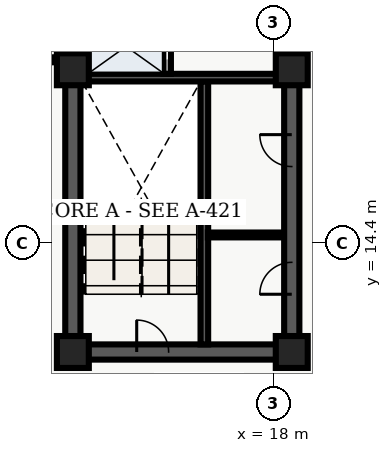
"""IFC4 building model, lengths in metres.
Left out: names, types, materials, properties, quantities, classifications, styles, units other than length and angle.
Written with IfcOpenShell. Run it as: python <this file> out.ifc"""

import sys

from ifc_helpers import new_model, entity, si_unit, converted_unit, direction, frame, origin_with_axes, origin_2d_with_axis, place, context, subcontext, project, spatial, polyline, rectangle, outline, extrude, element, fill, save


model = new_model("IFC4")
c1 = context("Model", 3, precision=1e-05, world=origin_with_axes(), true_north=direction((0.0, 1.0)))
c2 = subcontext(c1, "Body", "Model", "MODEL_VIEW")
j1 = project(units=[si_unit("LENGTHUNIT", "METRE"), converted_unit("PLANEANGLEUNIT", "DEGREE", entity("IfcPlaneAngleMeasure", 0.017), si_unit("PLANEANGLEUNIT", "RADIAN"), dimensions=[0, 0, 0, 0, 0, 0, 0])], contexts=[c1])
p1 = place(None, origin_with_axes())
s1 = spatial("IfcSite", under=j1, at=p1, CompositionType="ELEMENT")
p2 = place(p1, origin_with_axes())
s2 = spatial("IfcBuilding", under=s1, at=p2, CompositionType="ELEMENT")
p3 = place(p2, frame((0.0, 0.0, 160.2), z_axis=(0.0, 0.0, 1.0), x_axis=(1.0, 0.0, 0.0)))
s3 = spatial("IfcBuildingStorey", under=s2, at=p3, CompositionType="ELEMENT", Elevation=160.2)
p4 = place(p3, frame((11.4, 10.8, 0.0), z_axis=(0.0, 0.0, 1.0), x_axis=(0.0, 1.0, 0.0)))
e1 = element("IfcWall", 1, at=p4, inside=s3, PredefinedType="SHEAR", context=c2, shape_type="SweptSolid", body=[
    extrude(outline(polyline([(0.0, -0.25), (27.0, -0.25), (27.0, 0.25), (0.0, 0.25), (0.0, -0.25)])), origin_with_axes(), (0.0, 0.0, 1.0), 3.66),
])
p5 = place(p3, frame((11.4, 10.8, 0.0), z_axis=(0.0, 0.0, 1.0), x_axis=(1.0, 0.0, 0.0)))
e2 = element("IfcWall", 2, at=p5, inside=s3, PredefinedType="SHEAR", context=c2, shape_type="SweptSolid", body=[
    extrude(outline(polyline([(0.0, -0.25), (7.2, -0.25), (7.2, 0.25), (0.0, 0.25), (0.0, -0.25)])), origin_with_axes(), (0.0, 0.0, 1.0), 3.66),
])
p6 = place(p5, frame((2.625, 0.0, 0.0), z_axis=(0.0, 0.0, 1.0), x_axis=(1.0, 0.0, 0.0)))
e3 = element("IfcOpeningElement", 3, at=p6, cuts=e2, PredefinedType="OPENING", context=c2, shape_type="SweptSolid", body=[
    extrude(rectangle(XDim=1.05, YDim=0.52, at=origin_2d_with_axis()), origin_with_axes(), (0.0, 0.0, 1.0), 2.15),
])
p7 = place(p3, frame((18.6, 10.8, 0.0), z_axis=(0.0, 0.0, 1.0), x_axis=(0.0, 1.0, 0.0)))
e4 = element("IfcWall", 4, at=p7, inside=s3, PredefinedType="SHEAR", context=c2, shape_type="SweptSolid", body=[
    extrude(outline(polyline([(0.0, -0.25), (13.5, -0.25), (13.5, 0.25), (0.0, 0.25), (0.0, -0.25)])), origin_with_axes(), (0.0, 0.0, 1.0), 3.66),
])
p8 = place(p7, frame((11.125, 0.0, 0.0), z_axis=(0.0, 0.0, 1.0), x_axis=(1.0, 0.0, 0.0)))
e5 = element("IfcOpeningElement", 5, at=p8, cuts=e4, PredefinedType="OPENING", context=c2, shape_type="SweptSolid", body=[
    extrude(rectangle(XDim=1.05, YDim=0.52, at=origin_2d_with_axis()), origin_with_axes(), (0.0, 0.0, 1.0), 2.15),
])
p9 = place(p7, frame((2.425, 0.0, 0.0), z_axis=(0.0, 0.0, 1.0), x_axis=(1.0, 0.0, 0.0)))
e6 = element("IfcOpeningElement", 6, at=p9, cuts=e4, PredefinedType="OPENING", context=c2, shape_type="SweptSolid", body=[
    extrude(rectangle(XDim=1.05, YDim=0.52, at=origin_2d_with_axis()), origin_with_axes(), (0.0, 0.0, 1.0), 2.15),
])
p10 = place(p7, frame((6.625, 0.0, 0.0), z_axis=(0.0, 0.0, 1.0), x_axis=(1.0, 0.0, 0.0)))
e7 = element("IfcOpeningElement", 7, at=p10, cuts=e4, PredefinedType="OPENING", context=c2, shape_type="SweptSolid", body=[
    extrude(rectangle(XDim=1.05, YDim=0.52, at=origin_2d_with_axis()), origin_with_axes(), (0.0, 0.0, 1.0), 2.15),
])
p11 = place(p3, frame((15.725, 11.05, 0.0), z_axis=(0.0, 0.0, 1.0), x_axis=(0.0, 1.0, 0.0)))
e8 = element("IfcWall", 8, at=p11, inside=s3, PredefinedType="SHEAR", context=c2, shape_type="SweptSolid", body=[
    extrude(outline(polyline([(0.0, -0.125), (8.65, -0.125), (8.65, 0.125), (0.0, 0.125), (0.0, -0.125)])), origin_with_axes(), (0.0, 0.0, 1.0), 3.66),
])
p12 = place(p3, frame((11.65, 19.825, 0.0), z_axis=(0.0, 0.0, 1.0), x_axis=(1.0, 0.0, 0.0)))
e9 = element("IfcWall", 9, at=p12, inside=s3, PredefinedType="SHEAR", context=c2, shape_type="SweptSolid", body=[
    extrude(outline(polyline([(0.0, -0.125), (6.7, -0.125), (6.7, 0.125), (0.0, 0.125), (0.0, -0.125)])), origin_with_axes(), (0.0, 0.0, 1.0), 3.66),
])
p13 = place(p3, frame((14.5, 19.95, 0.0), z_axis=(0.0, 0.0, 1.0), x_axis=(0.0, 1.0, 0.0)))
e10 = element("IfcWall", 10, at=p13, inside=s3, PredefinedType="SOLIDWALL", context=c2, shape_type="SweptSolid", body=[
    extrude(outline(polyline([(0.0, -0.125), (6.25, -0.125), (6.25, 0.125), (0.0, 0.125), (0.0, -0.125)])), origin_with_axes(), (0.0, 0.0, 1.0), 2.7),
])
p14 = place(p13, frame((1.025, 0.0, 0.0), z_axis=(0.0, 0.0, 1.0), x_axis=(1.0, 0.0, 0.0)))
e11 = element("IfcOpeningElement", 11, at=p14, cuts=e10, PredefinedType="OPENING", context=c2, shape_type="SweptSolid", body=[
    extrude(rectangle(XDim=1.1, YDim=0.27, at=origin_2d_with_axis()), origin_with_axes(), (0.0, 0.0, 1.0), 2.15),
])
p15 = place(p13, frame((2.975, 0.0, 0.0), z_axis=(0.0, 0.0, 1.0), x_axis=(1.0, 0.0, 0.0)))
e12 = element("IfcOpeningElement", 12, at=p15, cuts=e10, PredefinedType="OPENING", context=c2, shape_type="SweptSolid", body=[
    extrude(rectangle(XDim=1.1, YDim=0.27, at=origin_2d_with_axis()), origin_with_axes(), (0.0, 0.0, 1.0), 2.15),
])
p16 = place(p13, frame((5.425, 0.0, 0.0), z_axis=(0.0, 0.0, 1.0), x_axis=(1.0, 0.0, 0.0)))
e13 = element("IfcOpeningElement", 13, at=p16, cuts=e10, PredefinedType="OPENING", context=c2, shape_type="SweptSolid", body=[
    extrude(rectangle(XDim=1.2, YDim=0.27, at=origin_2d_with_axis()), origin_with_axes(), (0.0, 0.0, 1.0), 2.15),
])
for number, where, z_axis, x_axis in (
    (14, (11.4, 10.8, 0.0), (0.0, 0.0, 1.0), (1.0, 0.0, 0.0)),
    (15, (11.4, 20.1, 0.0), (0.0, 0.0, 1.0), (1.0, 0.0, 0.0)),
    (16, (18.6, 10.8, 0.0), (0.0, 0.0, 1.0), (1.0, 0.0, 0.0)),
    (17, (18.6, 20.1, 0.0), (0.0, 0.0, 1.0), (1.0, 0.0, 0.0)),
):
    element("IfcColumn", number, at=place(p3, frame(where, z_axis=z_axis, x_axis=x_axis)), inside=s3, PredefinedType="COLUMN", context=c2, shape_type="SweptSolid", body=[
        extrude(rectangle(XDim=1.05, YDim=1.05, at=origin_2d_with_axis()), origin_with_axes(), (0.0, 0.0, 1.0), 3.9),
    ])
p17 = place(p3, frame((15.84, 14.65, 0.0), z_axis=(0.0, 0.0, 1.0), x_axis=(1.0, 0.0, 0.0)))
e18 = element("IfcWall", 18, at=p17, inside=s3, PredefinedType="PARTITIONING", context=c2, shape_type="SweptSolid", body=[
    extrude(outline(polyline([(0.0, -0.08), (2.46, -0.08), (2.46, 0.08), (0.0, 0.08), (0.0, -0.08)])), origin_with_axes(), (0.0, 0.0, 1.0), 2.7),
])
p18 = place(p3, frame((9.52, 20.4, 0.0), z_axis=(0.0, 0.0, 1.0), x_axis=(1.0, 0.0, 0.0)))
e19 = element("IfcWall", 19, at=p18, inside=s3, PredefinedType="PARTITIONING", context=c2, shape_type="SweptSolid", body=[
    extrude(outline(polyline([(0.0, -0.07), (1.58, -0.07), (1.58, 0.07), (0.0, 0.07), (0.0, -0.07)])), origin_with_axes(), (0.0, 0.0, 1.0), 2.7),
])
p19 = place(p18, frame((0.59, 0.0, 0.0), z_axis=(0.0, 0.0, 1.0), x_axis=(1.0, 0.0, 0.0)))
e20 = element("IfcOpeningElement", 20, at=p19, cuts=e19, PredefinedType="OPENING", context=c2, shape_type="SweptSolid", body=[
    extrude(rectangle(XDim=0.9, YDim=0.16, at=origin_2d_with_axis()), origin_with_axes(), (0.0, 0.0, 1.0), 2.15),
])
p20 = place(p13, frame((1.025, 0.0, 0.0), z_axis=(0.0, 0.0, 1.0), x_axis=(1.0, 0.0, 0.0)))
e21 = element("IfcDoor", 21, at=p20, inside=s3, OperationType="SLIDING_TO_LEFT", PredefinedType="DOOR", context=c2, shape_type="SweptSolid", body=[
    extrude(rectangle(XDim=1.1, YDim=0.09, at=origin_2d_with_axis()), origin_with_axes(), (0.0, 0.0, 1.0), 2.15),
])
fill(e11, e21)
p21 = place(p5, frame((2.625, 0.0, 0.0), z_axis=(0.0, 0.0, 1.0), x_axis=(1.0, 0.0, 0.0)))
e22 = element("IfcDoor", 22, at=p21, inside=s3, OperationType="SINGLE_SWING_LEFT", PredefinedType="DOOR", context=c2, shape_type="SweptSolid", body=[
    extrude(rectangle(XDim=1.05, YDim=0.09, at=origin_2d_with_axis()), origin_with_axes(), (0.0, 0.0, 1.0), 2.15),
])
fill(e3, e22)
p22 = place(p7, frame((2.425, 0.0, 0.0), z_axis=(0.0, 0.0, 1.0), x_axis=(1.0, 0.0, 0.0)))
e23 = element("IfcDoor", 23, at=p22, inside=s3, OperationType="SINGLE_SWING_LEFT", PredefinedType="DOOR", context=c2, shape_type="SweptSolid", body=[
    extrude(rectangle(XDim=1.05, YDim=0.09, at=origin_2d_with_axis()), origin_with_axes(), (0.0, 0.0, 1.0), 2.15),
])
fill(e6, e23)
p23 = place(p7, frame((6.625, 0.0, 0.0), z_axis=(0.0, 0.0, 1.0), x_axis=(1.0, 0.0, 0.0)))
e24 = element("IfcDoor", 24, at=p23, inside=s3, OperationType="SINGLE_SWING_RIGHT", PredefinedType="DOOR", context=c2, shape_type="SweptSolid", body=[
    extrude(rectangle(XDim=1.05, YDim=0.09, at=origin_2d_with_axis()), origin_with_axes(), (0.0, 0.0, 1.0), 2.15),
])
fill(e7, e24)
save(model, sys.argv[1])
